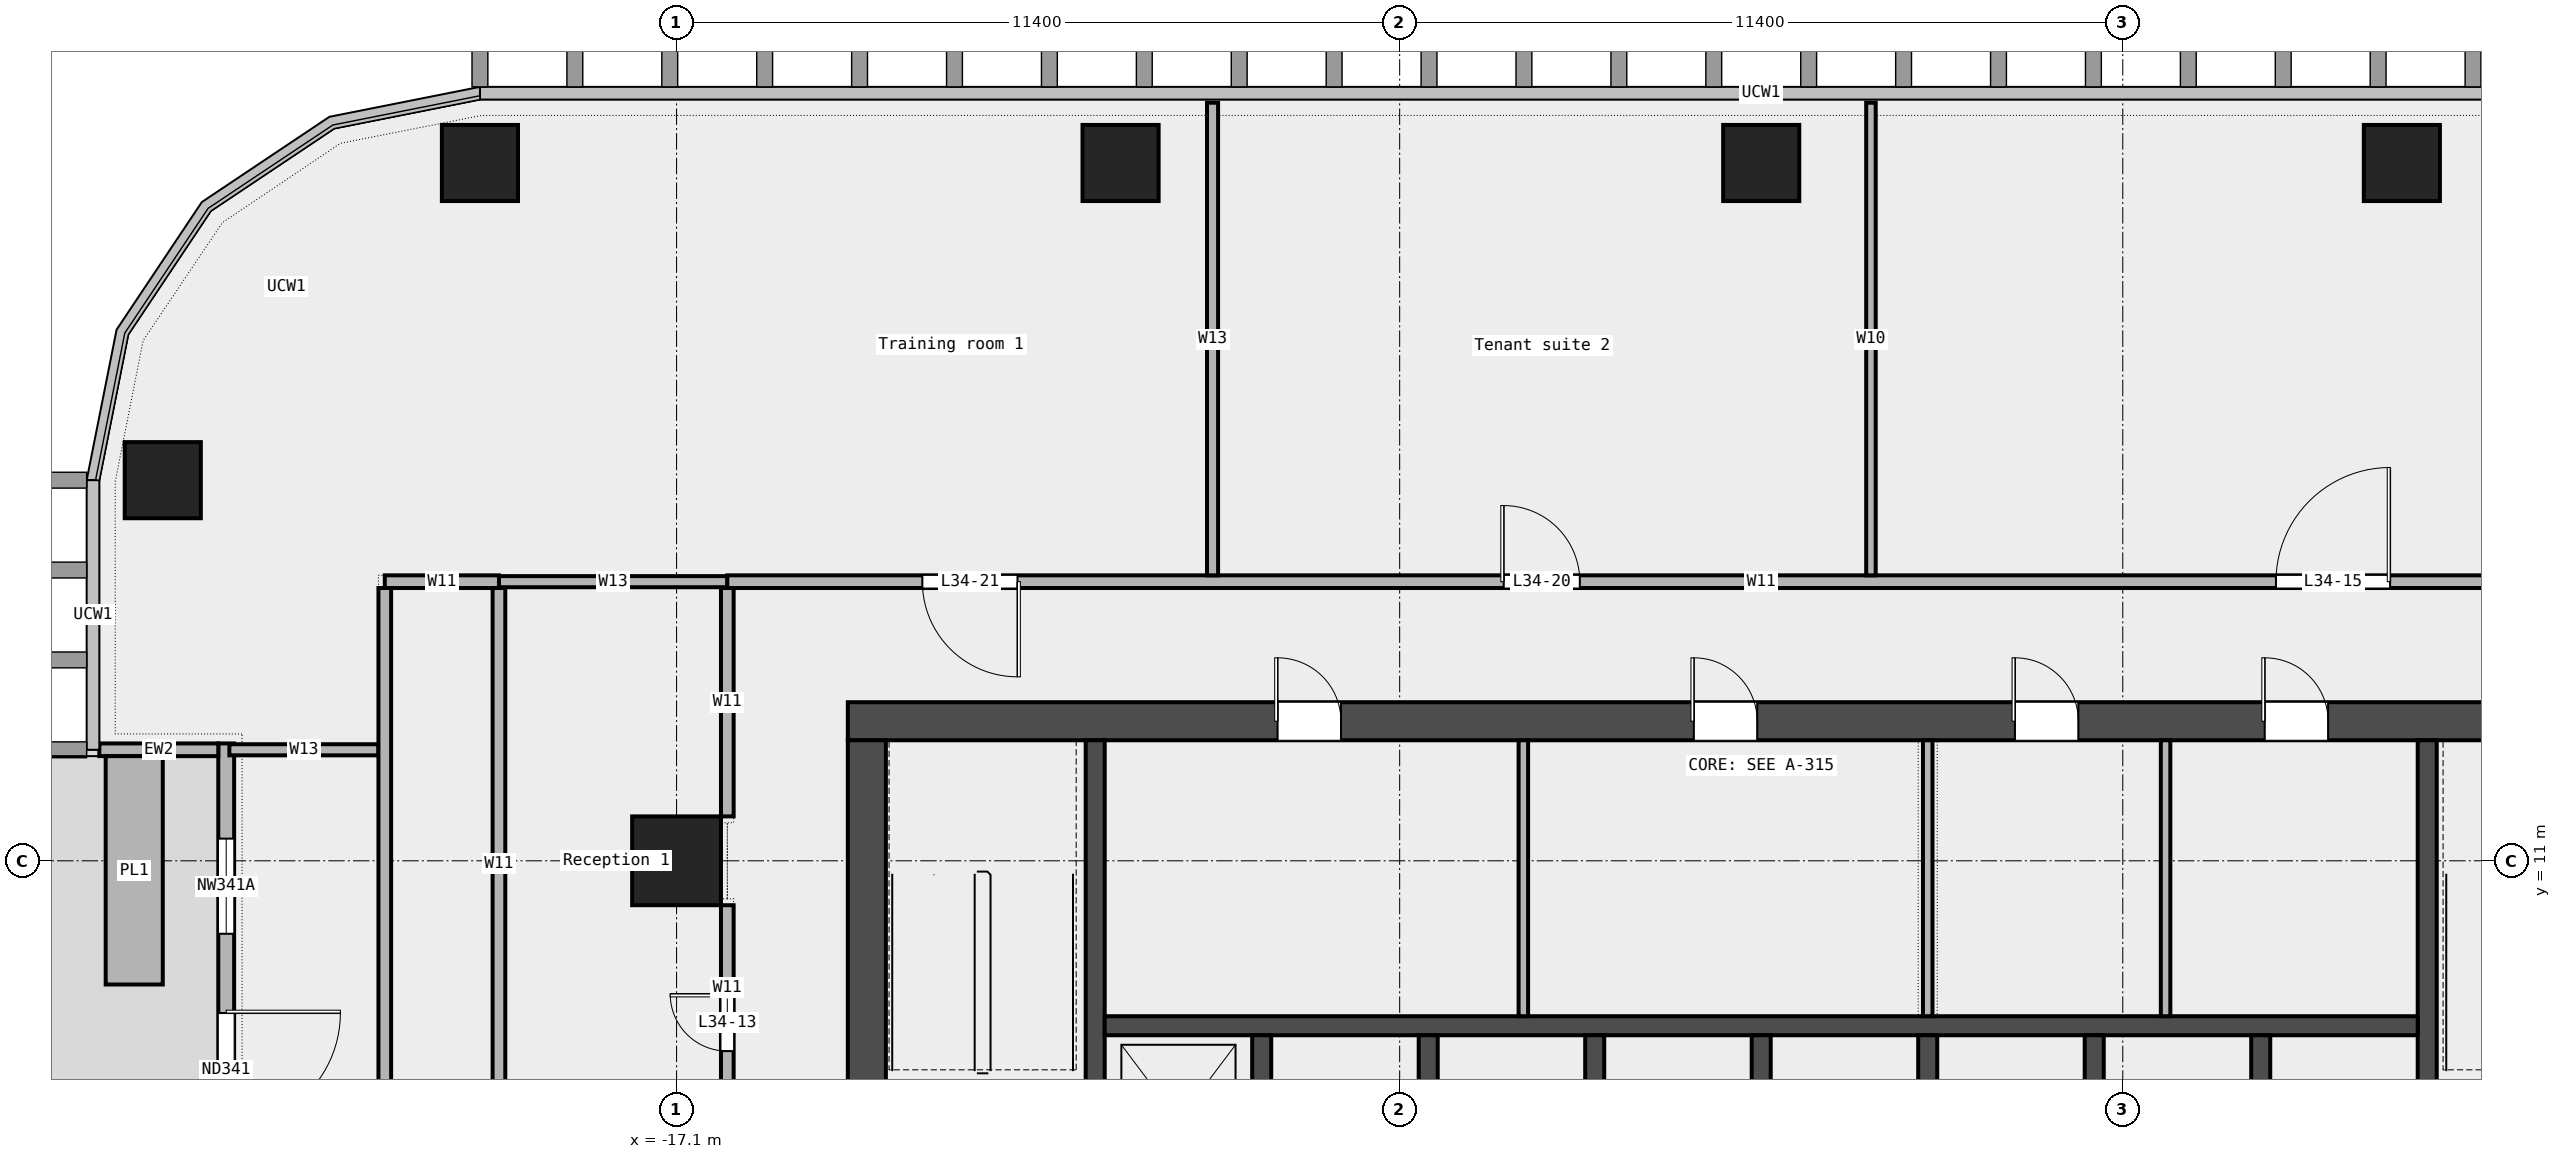
"""IFC4 building model, lengths in metres.
Left out: names, types, materials, properties, quantities, classifications, styles, units other than length and angle.
Written with IfcOpenShell. Run it as: python <this file> out.ifc"""

import sys

from ifc_helpers import new_model, si_unit, direction, frame, frame_2d, origin, origin_2d, place, context, subcontext, project, spatial, rectangle, extrude, element, fill, save


model = new_model("IFC4")
c1 = context("Model", 3, precision=1e-05, world=origin(), true_north=direction((0.0, 1.0)))
c2 = subcontext(c1, "Body", "Model", "MODEL_VIEW")
j1 = project(units=[si_unit("LENGTHUNIT", "METRE"), si_unit("PLANEANGLEUNIT", "RADIAN")], contexts=[c1])
p1 = place(None, origin())
s1 = spatial("IfcSite", under=j1, at=p1, CompositionType="ELEMENT")
p2 = place(p1, origin())
s2 = spatial("IfcBuilding", under=s1, at=p2, CompositionType="ELEMENT")
p3 = place(p2, frame((0.0, 0.0, 169.0)))
s3 = spatial("IfcBuildingStorey", under=s2, at=p3, CompositionType="ELEMENT", Elevation=169.0)
for number, where, z_axis, x_axis in (
    (1, (10.1, 22.0, 0.0), (0.0, 0.0, 1.0), (1.0, 0.0, 0.0)),
    (2, (0.0, 22.0, 0.0), (0.0, 0.0, 1.0), (1.0, 0.0, 0.0)),
    (3, (-10.1, 22.0, 0.0), (0.0, 0.0, 1.0), (1.0, 0.0, 0.0)),
    (4, (-20.2, 22.0, 0.0), (0.0, 0.0, 1.0), (1.0, 0.0, 0.0)),
    (5, (-25.2, 17.0, 0.0), (0.0, 0.0, 1.0), (1.0, 0.0, 0.0)),
):
    element("IfcColumn", number, at=place(p3, frame(where, z_axis=z_axis, x_axis=x_axis)), inside=s3, PredefinedType="COLUMN", context=c2, shape_type="SweptSolid", body=[
        extrude(rectangle(XDim=1.2, YDim=1.2, at=origin_2d()), origin(), (0.0, 0.0, 1.0), 3.6),
    ])
p4 = place(p3, frame((-17.1, 11.0, 0.0), z_axis=(0.0, 0.0, 1.0), x_axis=(1.0, 0.0, 0.0)))
e6 = element("IfcColumn", 6, at=p4, inside=s3, PredefinedType="COLUMN", context=c2, shape_type="SweptSolid", body=[
    extrude(rectangle(XDim=1.4, YDim=1.4, at=origin_2d()), origin(), (0.0, 0.0, 1.0), 3.6),
])
p5 = place(p3, frame((-24.2, 12.85, 0.0), z_axis=(0.0, 0.0, 1.0), x_axis=(0.0, -1.0, 0.0)))
e7 = element("IfcWall", 7, at=p5, inside=s3, PredefinedType="STANDARD", context=c2, shape_type="SweptSolid", body=[
    extrude(rectangle(XDim=12.95, YDim=0.25, at=frame_2d((6.475, 0.0))), origin(), (0.0, 0.0, 1.0), 3.6),
])
p6 = place(p5, frame((1.5, 0.0, 0.45)))
e8 = element("IfcOpeningElement", 8, at=p6, cuts=e7, PredefinedType="OPENING", context=c2, shape_type="SweptSolid", body=[
    extrude(rectangle(XDim=1.5, YDim=2.4, at=frame_2d((0.75, 1.2))), frame((0.0, 0.137, 0.0), z_axis=(0.0, -1.0, 0.0), x_axis=(1.0, 0.0, 0.0)), (0.0, 0.0, 1.0), 0.274),
])
p7 = place(p5, frame((4.25, 0.0, 0.0)))
e9 = element("IfcOpeningElement", 9, at=p7, cuts=e7, PredefinedType="OPENING", context=c2, shape_type="SweptSolid", body=[
    extrude(rectangle(XDim=1.8, YDim=2.4, at=frame_2d((0.9, 1.2))), frame((0.0, 0.137, 0.0), z_axis=(0.0, -1.0, 0.0), x_axis=(1.0, 0.0, 0.0)), (0.0, 0.0, 1.0), 0.274),
])
p8 = place(p5, frame((10.0, 0.0, 0.45)))
e10 = element("IfcOpeningElement", 10, at=p8, cuts=e7, PredefinedType="OPENING", context=c2, shape_type="SweptSolid", body=[
    extrude(rectangle(XDim=1.5, YDim=2.4, at=frame_2d((0.75, 1.2))), frame((0.0, 0.137, 0.0), z_axis=(0.0, -1.0, 0.0), x_axis=(1.0, 0.0, 0.0)), (0.0, 0.0, 1.0), 0.274),
])
p9 = place(p3, frame((-26.2, 12.75, 0.0), z_axis=(0.0, 0.0, 1.0), x_axis=(1.0, 0.0, 0.0)))
e11 = element("IfcWall", 11, at=p9, inside=s3, PredefinedType="STANDARD", context=c2, shape_type="SweptSolid", body=[
    extrude(rectangle(XDim=1.875, YDim=0.2, at=frame_2d((0.938, 0.0))), origin(), (0.0, 0.0, 1.0), 3.6),
])
p10 = place(p3, frame((-25.65, 12.65, 0.0), z_axis=(0.0, 0.0, 1.0), x_axis=(0.0, -1.0, 0.0)))
e12 = element("IfcWall", 12, at=p10, inside=s3, PredefinedType="STANDARD", context=c2, shape_type="SweptSolid", body=[
    extrude(rectangle(XDim=3.6, YDim=0.9, at=frame_2d((1.8, 0.0))), origin(), (0.0, 0.0, 1.0), 0.7),
])
p11 = place(p3, frame((-24.15, 12.75, 0.0), z_axis=(0.0, 0.0, 1.0), x_axis=(1.0, 0.0, 0.0)))
e13 = element("IfcWall", 13, at=p11, inside=s3, PredefinedType="PARTITIONING", context=c2, shape_type="SweptSolid", body=[
    extrude(rectangle(XDim=2.35, YDim=0.175, at=frame_2d((1.175, 0.0))), origin(), (0.0, 0.0, 1.0), 3.6),
])
p12 = place(p3, frame((-19.9, 15.4, 0.0), z_axis=(0.0, 0.0, 1.0), x_axis=(1.0, 0.0, 0.0)))
e14 = element("IfcWall", 14, at=p12, inside=s3, PredefinedType="PARTITIONING", context=c2, shape_type="SweptSolid", body=[
    extrude(rectangle(XDim=3.6, YDim=0.175, at=frame_2d((1.8, 0.0))), origin(), (0.0, 0.0, 1.0), 3.6),
])
p13 = place(p3, frame((-21.7, 15.4, 0.0), z_axis=(0.0, 0.0, 1.0), x_axis=(1.0, 0.0, 0.0)))
e15 = element("IfcWall", 15, at=p13, inside=s3, PredefinedType="PARTITIONING", context=c2, shape_type="SweptSolid", body=[
    extrude(rectangle(XDim=1.8, YDim=0.2, at=frame_2d((0.9, 0.0))), origin(), (0.0, 0.0, 1.0), 3.6),
])
p14 = place(p3, frame((-16.3, 15.4, 0.0), z_axis=(0.0, 0.0, 1.0), x_axis=(1.0, 0.0, 0.0)))
e16 = element("IfcWall", 16, at=p14, inside=s3, PredefinedType="PARTITIONING", context=c2, shape_type="SweptSolid", body=[
    extrude(rectangle(XDim=32.6, YDim=0.2, at=frame_2d((16.3, 0.0))), origin(), (0.0, 0.0, 1.0), 3.6),
])
p15 = place(p14, frame((24.415, 0.0, 0.0)))
e17 = element("IfcOpeningElement", 17, at=p15, cuts=e16, PredefinedType="OPENING", context=c2, shape_type="SweptSolid", body=[
    extrude(rectangle(XDim=1.8, YDim=2.1, at=frame_2d((0.9, 1.05))), frame((0.0, 0.112, 0.0), z_axis=(0.0, -1.0, 0.0), x_axis=(1.0, 0.0, 0.0)), (0.0, 0.0, 1.0), 0.224),
])
p16 = place(p14, frame((12.24, 0.0, 0.0)))
e18 = element("IfcOpeningElement", 18, at=p16, cuts=e16, PredefinedType="OPENING", context=c2, shape_type="SweptSolid", body=[
    extrude(rectangle(XDim=1.2, YDim=2.1, at=frame_2d((0.6, 1.05))), frame((0.0, 0.112, 0.0), z_axis=(0.0, -1.0, 0.0), x_axis=(1.0, 0.0, 0.0)), (0.0, 0.0, 1.0), 0.224),
])
p17 = place(p14, frame((3.075, 0.0, 0.0)))
e19 = element("IfcOpeningElement", 19, at=p17, cuts=e16, PredefinedType="OPENING", context=c2, shape_type="SweptSolid", body=[
    extrude(rectangle(XDim=1.5, YDim=2.1, at=frame_2d((0.75, 1.05))), frame((0.0, 0.112, 0.0), z_axis=(0.0, -1.0, 0.0), x_axis=(1.0, 0.0, 0.0)), (0.0, 0.0, 1.0), 0.224),
])
p18 = place(p3, frame((-21.7, -9.0, 0.0), z_axis=(0.0, 0.0, 1.0), x_axis=(0.0, 1.0, 0.0)))
e20 = element("IfcWall", 20, at=p18, inside=s3, PredefinedType="PARTITIONING", context=c2, shape_type="SweptSolid", body=[
    extrude(rectangle(XDim=24.3, YDim=0.2, at=frame_2d((12.15, 0.0))), origin(), (0.0, 0.0, 1.0), 3.6),
])
p19 = place(p18, frame((14.925, 0.0, 0.0)))
e21 = element("IfcOpeningElement", 21, at=p19, cuts=e20, PredefinedType="OPENING", context=c2, shape_type="SweptSolid", body=[
    extrude(rectangle(XDim=0.9, YDim=2.1, at=frame_2d((0.45, 1.05))), frame((0.0, 0.112, 0.0), z_axis=(0.0, -1.0, 0.0), x_axis=(1.0, 0.0, 0.0)), (0.0, 0.0, 1.0), 0.224),
])
p20 = place(p18, frame((2.562, 0.0, 0.0)))
e22 = element("IfcOpeningElement", 22, at=p20, cuts=e20, PredefinedType="OPENING", context=c2, shape_type="SweptSolid", body=[
    extrude(rectangle(XDim=0.9, YDim=2.1, at=frame_2d((0.45, 1.05))), frame((0.0, 0.112, 0.0), z_axis=(0.0, -1.0, 0.0), x_axis=(1.0, 0.0, 0.0)), (0.0, 0.0, 1.0), 0.224),
])
p21 = place(p3, frame((-19.9, 6.6, 0.0), z_axis=(0.0, 0.0, 1.0), x_axis=(0.0, 1.0, 0.0)))
e23 = element("IfcWall", 23, at=p21, inside=s3, PredefinedType="PARTITIONING", context=c2, shape_type="SweptSolid", body=[
    extrude(rectangle(XDim=8.7, YDim=0.2, at=frame_2d((4.35, 0.0))), origin(), (0.0, 0.0, 1.0), 3.6),
])
p22 = place(p3, frame((-16.3, 6.6, 0.0), z_axis=(0.0, 0.0, 1.0), x_axis=(0.0, 1.0, 0.0)))
e24 = element("IfcWall", 24, at=p22, inside=s3, PredefinedType="PARTITIONING", context=c2, shape_type="SweptSolid", body=[
    extrude(rectangle(XDim=3.7, YDim=0.2, at=frame_2d((1.85, 0.0))), origin(), (0.0, 0.0, 1.0), 3.6),
])
p23 = place(p22, frame((1.4, 0.0, 0.0)))
e25 = element("IfcOpeningElement", 25, at=p23, cuts=e24, PredefinedType="OPENING", context=c2, shape_type="SweptSolid", body=[
    extrude(rectangle(XDim=0.9, YDim=2.1, at=frame_2d((0.45, 1.05))), frame((0.0, 0.112, 0.0), z_axis=(0.0, -1.0, 0.0), x_axis=(1.0, 0.0, 0.0)), (0.0, 0.0, 1.0), 0.224),
])
p24 = place(p3, frame((-16.3, 11.7, 0.0), z_axis=(0.0, 0.0, 1.0), x_axis=(0.0, 1.0, 0.0)))
e26 = element("IfcWall", 26, at=p24, inside=s3, PredefinedType="PARTITIONING", context=c2, shape_type="SweptSolid", body=[
    extrude(rectangle(XDim=3.6, YDim=0.2, at=frame_2d((1.8, 0.0))), origin(), (0.0, 0.0, 1.0), 3.6),
])
p25 = place(p3, frame((-8.65, 15.5, 0.0), z_axis=(0.0, 0.0, 1.0), x_axis=(0.0, 1.0, 0.0)))
e27 = element("IfcWall", 27, at=p25, inside=s3, PredefinedType="PARTITIONING", context=c2, shape_type="SweptSolid", body=[
    extrude(rectangle(XDim=7.45, YDim=0.175, at=frame_2d((3.725, 0.0))), origin(), (0.0, 0.0, 1.0), 3.6),
])
p26 = place(p3, frame((1.73, 15.5, 0.0), z_axis=(0.0, 0.0, 1.0), x_axis=(0.0, 1.0, 0.0)))
e28 = element("IfcWall", 28, at=p26, inside=s3, PredefinedType="PARTITIONING", context=c2, shape_type="SweptSolid", body=[
    extrude(rectangle(XDim=7.45, YDim=0.15, at=frame_2d((3.725, 0.0))), origin(), (0.0, 0.0, 1.0), 3.6),
])
p27 = place(p3, frame((-14.4, 13.2, 0.0), z_axis=(0.0, 0.0, 1.0), x_axis=(1.0, 0.0, 0.0)))
e29 = element("IfcWall", 29, at=p27, inside=s3, PredefinedType="SHEAR", context=c2, shape_type="SweptSolid", body=[
    extrude(rectangle(XDim=28.8, YDim=0.6, at=frame_2d((14.4, 0.0))), origin(), (0.0, 0.0, 1.0), 3.7),
])
p28 = place(p27, frame((6.775, 0.0, 0.0)))
e30 = element("IfcOpeningElement", 30, at=p28, cuts=e29, PredefinedType="OPENING", context=c2, shape_type="SweptSolid", body=[
    extrude(rectangle(XDim=1.0, YDim=2.1, at=frame_2d((0.5, 1.05))), frame((0.0, 0.312, 0.0), z_axis=(0.0, -1.0, 0.0), x_axis=(1.0, 0.0, 0.0)), (0.0, 0.0, 1.0), 0.624),
])
p29 = place(p27, frame((13.337, 0.0, 0.0)))
e31 = element("IfcOpeningElement", 31, at=p29, cuts=e29, PredefinedType="OPENING", context=c2, shape_type="SweptSolid", body=[
    extrude(rectangle(XDim=1.0, YDim=2.1, at=frame_2d((0.5, 1.05))), frame((0.0, 0.312, 0.0), z_axis=(0.0, -1.0, 0.0), x_axis=(1.0, 0.0, 0.0)), (0.0, 0.0, 1.0), 0.624),
])
p30 = place(p27, frame((18.4, 0.0, 0.0)))
e32 = element("IfcOpeningElement", 32, at=p30, cuts=e29, PredefinedType="OPENING", context=c2, shape_type="SweptSolid", body=[
    extrude(rectangle(XDim=1.0, YDim=2.1, at=frame_2d((0.5, 1.05))), frame((0.0, 0.312, 0.0), z_axis=(0.0, -1.0, 0.0), x_axis=(1.0, 0.0, 0.0)), (0.0, 0.0, 1.0), 0.624),
])
p31 = place(p27, frame((22.337, 0.0, 0.0)))
e33 = element("IfcOpeningElement", 33, at=p31, cuts=e29, PredefinedType="OPENING", context=c2, shape_type="SweptSolid", body=[
    extrude(rectangle(XDim=1.0, YDim=2.1, at=frame_2d((0.5, 1.05))), frame((0.0, 0.312, 0.0), z_axis=(0.0, -1.0, 0.0), x_axis=(1.0, 0.0, 0.0)), (0.0, 0.0, 1.0), 0.624),
])
p32 = place(p3, frame((-14.1, -6.6, 0.0), z_axis=(0.0, 0.0, 1.0), x_axis=(0.0, 1.0, 0.0)))
e34 = element("IfcWall", 34, at=p32, inside=s3, PredefinedType="SHEAR", context=c2, shape_type="SweptSolid", body=[
    extrude(rectangle(XDim=19.5, YDim=0.6, at=frame_2d((9.75, 0.0))), origin(), (0.0, 0.0, 1.0), 3.7),
])
p33 = place(p32, frame((9.3, 0.0, 0.0)))
e35 = element("IfcOpeningElement", 35, at=p33, cuts=e34, PredefinedType="OPENING", context=c2, shape_type="SweptSolid", body=[
    extrude(rectangle(XDim=1.8, YDim=2.1, at=frame_2d((0.9, 1.05))), frame((0.0, 0.312, 0.0), z_axis=(0.0, -1.0, 0.0), x_axis=(1.0, 0.0, 0.0)), (0.0, 0.0, 1.0), 0.624),
])
for number, where, z_axis, x_axis in (
    (36, (-10.5, 5.25, 0.0), (0.0, 0.0, 1.0), (0.0, 1.0, 0.0)),
    (37, (10.5, 5.25, 0.0), (0.0, 0.0, 1.0), (0.0, 1.0, 0.0)),
):
    element("IfcWall", number, at=place(p3, frame(where, z_axis=z_axis, x_axis=x_axis)), inside=s3, PredefinedType="SHEAR", context=c2, shape_type="SweptSolid", body=[
        extrude(rectangle(XDim=7.65, YDim=0.3, at=frame_2d((3.825, 0.0))), origin(), (0.0, 0.0, 1.0), 3.7),
    ])
p34 = place(p3, frame((-10.35, 8.4, 0.0), z_axis=(0.0, 0.0, 1.0), x_axis=(1.0, 0.0, 0.0)))
e38 = element("IfcWall", 38, at=p34, inside=s3, PredefinedType="SOLIDWALL", context=c2, shape_type="SweptSolid", body=[
    extrude(rectangle(XDim=20.7, YDim=0.3, at=frame_2d((10.35, 0.0))), origin(), (0.0, 0.0, 1.0), 3.7),
])
for number, where, z_axis, x_axis in (
    (39, (-7.875, 5.55, 0.0), (0.0, 0.0, 1.0), (0.0, 1.0, 0.0)),
    (40, (-5.25, 5.55, 0.0), (0.0, 0.0, 1.0), (0.0, 1.0, 0.0)),
    (41, (-2.625, 5.55, 0.0), (0.0, 0.0, 1.0), (0.0, 1.0, 0.0)),
    (42, (0.0, 5.55, 0.0), (0.0, 0.0, 1.0), (0.0, 1.0, 0.0)),
    (43, (2.625, 5.55, 0.0), (0.0, 0.0, 1.0), (0.0, 1.0, 0.0)),
    (44, (5.25, 5.55, 0.0), (0.0, 0.0, 1.0), (0.0, 1.0, 0.0)),
    (45, (7.875, 5.55, 0.0), (0.0, 0.0, 1.0), (0.0, 1.0, 0.0)),
):
    element("IfcWall", number, at=place(p3, frame(where, z_axis=z_axis, x_axis=x_axis)), inside=s3, PredefinedType="SOLIDWALL", context=c2, shape_type="SweptSolid", body=[
        extrude(rectangle(XDim=2.7, YDim=0.3, at=frame_2d((1.35, 0.0))), origin(), (0.0, 0.0, 1.0), 3.7),
    ])
for number, where, z_axis, x_axis in (
    (46, (-3.75, 8.55, 0.0), (0.0, 0.0, 1.0), (0.0, 1.0, 0.0)),
    (47, (2.625, 8.55, 0.0), (0.0, 0.0, 1.0), (0.0, 1.0, 0.0)),
    (48, (6.375, 8.55, 0.0), (0.0, 0.0, 1.0), (0.0, 1.0, 0.0)),
):
    element("IfcWall", number, at=place(p3, frame(where, z_axis=z_axis, x_axis=x_axis)), inside=s3, PredefinedType="PARTITIONING", context=c2, shape_type="SweptSolid", body=[
        extrude(rectangle(XDim=4.35, YDim=0.15, at=frame_2d((2.175, 0.0))), origin(), (0.0, 0.0, 1.0), 3.7),
    ])
p35 = place(p6, origin())
e49 = element("IfcWindow", 49, at=p35, inside=s3, PartitioningType="SINGLE_PANEL", PredefinedType="WINDOW", context=c2, shape_type="SweptSolid", body=[
    extrude(rectangle(XDim=1.5, YDim=2.4, at=frame_2d((0.75, 1.2))), frame((0.0, 0.03, 0.0), z_axis=(0.0, -1.0, 0.0), x_axis=(1.0, 0.0, 0.0)), (0.0, 0.0, 1.0), 0.06),
])
fill(e8, e49)
p36 = place(p7, origin())
e50 = element("IfcDoor", 50, at=p36, inside=s3, OperationType="DOUBLE_DOOR_SINGLE_SWING", PredefinedType="DOOR", context=c2, shape_type="SweptSolid", body=[
    extrude(rectangle(XDim=1.8, YDim=2.4, at=frame_2d((0.9, 1.2))), frame((0.0, 0.025, 0.0), z_axis=(0.0, -1.0, 0.0), x_axis=(1.0, 0.0, 0.0)), (0.0, 0.0, 1.0), 0.05),
])
fill(e9, e50)
p37 = place(p23, origin())
e51 = element("IfcDoor", 51, at=p37, inside=s3, OperationType="SINGLE_SWING_RIGHT", PredefinedType="DOOR", context=c2, shape_type="SweptSolid", body=[
    extrude(rectangle(XDim=0.9, YDim=2.1, at=frame_2d((0.45, 1.05))), frame((0.0, 0.025, 0.0), z_axis=(0.0, -1.0, 0.0), x_axis=(1.0, 0.0, 0.0)), (0.0, 0.0, 1.0), 0.05),
])
fill(e25, e51)
p38 = place(p15, origin())
e52 = element("IfcDoor", 52, at=p38, inside=s3, OperationType="DOUBLE_DOOR_SINGLE_SWING", PredefinedType="DOOR", context=c2, shape_type="SweptSolid", body=[
    extrude(rectangle(XDim=1.8, YDim=2.1, at=frame_2d((0.9, 1.05))), frame((0.0, 0.025, 0.0), z_axis=(0.0, -1.0, 0.0), x_axis=(1.0, 0.0, 0.0)), (0.0, 0.0, 1.0), 0.05),
])
fill(e17, e52)
p39 = place(p16, origin())
e53 = element("IfcDoor", 53, at=p39, inside=s3, OperationType="SINGLE_SWING_LEFT", PredefinedType="DOOR", context=c2, shape_type="SweptSolid", body=[
    extrude(rectangle(XDim=1.2, YDim=2.1, at=frame_2d((0.6, 1.05))), frame((0.0, 0.025, 0.0), z_axis=(0.0, -1.0, 0.0), x_axis=(1.0, 0.0, 0.0)), (0.0, 0.0, 1.0), 0.05),
])
fill(e18, e53)
p40 = place(p17, origin())
e54 = element("IfcDoor", 54, at=p40, inside=s3, OperationType="DOUBLE_DOOR_SINGLE_SWING", PredefinedType="DOOR", context=c2, shape_type="SweptSolid", body=[
    extrude(rectangle(XDim=1.5, YDim=2.1, at=frame_2d((0.75, 1.05))), frame((0.0, 0.025, 0.0), z_axis=(0.0, -1.0, 0.0), x_axis=(1.0, 0.0, 0.0)), (0.0, 0.0, 1.0), 0.05),
])
fill(e19, e54)
p41 = place(p28, origin())
e55 = element("IfcDoor", 55, at=p41, inside=s3, OperationType="SINGLE_SWING_LEFT", PredefinedType="DOOR", context=c2, shape_type="SweptSolid", body=[
    extrude(rectangle(XDim=1.0, YDim=2.1, at=frame_2d((0.5, 1.05))), frame((0.0, 0.025, 0.0), z_axis=(0.0, -1.0, 0.0), x_axis=(1.0, 0.0, 0.0)), (0.0, 0.0, 1.0), 0.05),
])
fill(e30, e55)
p42 = place(p29, origin())
e56 = element("IfcDoor", 56, at=p42, inside=s3, OperationType="SINGLE_SWING_LEFT", PredefinedType="DOOR", context=c2, shape_type="SweptSolid", body=[
    extrude(rectangle(XDim=1.0, YDim=2.1, at=frame_2d((0.5, 1.05))), frame((0.0, 0.025, 0.0), z_axis=(0.0, -1.0, 0.0), x_axis=(1.0, 0.0, 0.0)), (0.0, 0.0, 1.0), 0.05),
])
fill(e31, e56)
p43 = place(p30, origin())
e57 = element("IfcDoor", 57, at=p43, inside=s3, OperationType="SINGLE_SWING_LEFT", PredefinedType="DOOR", context=c2, shape_type="SweptSolid", body=[
    extrude(rectangle(XDim=1.0, YDim=2.1, at=frame_2d((0.5, 1.05))), frame((0.0, 0.025, 0.0), z_axis=(0.0, -1.0, 0.0), x_axis=(1.0, 0.0, 0.0)), (0.0, 0.0, 1.0), 0.05),
])
fill(e32, e57)
p44 = place(p31, origin())
e58 = element("IfcDoor", 58, at=p44, inside=s3, OperationType="SINGLE_SWING_LEFT", PredefinedType="DOOR", context=c2, shape_type="SweptSolid", body=[
    extrude(rectangle(XDim=1.0, YDim=2.1, at=frame_2d((0.5, 1.05))), frame((0.0, 0.025, 0.0), z_axis=(0.0, -1.0, 0.0), x_axis=(1.0, 0.0, 0.0)), (0.0, 0.0, 1.0), 0.05),
])
fill(e33, e58)
save(model, sys.argv[1])
